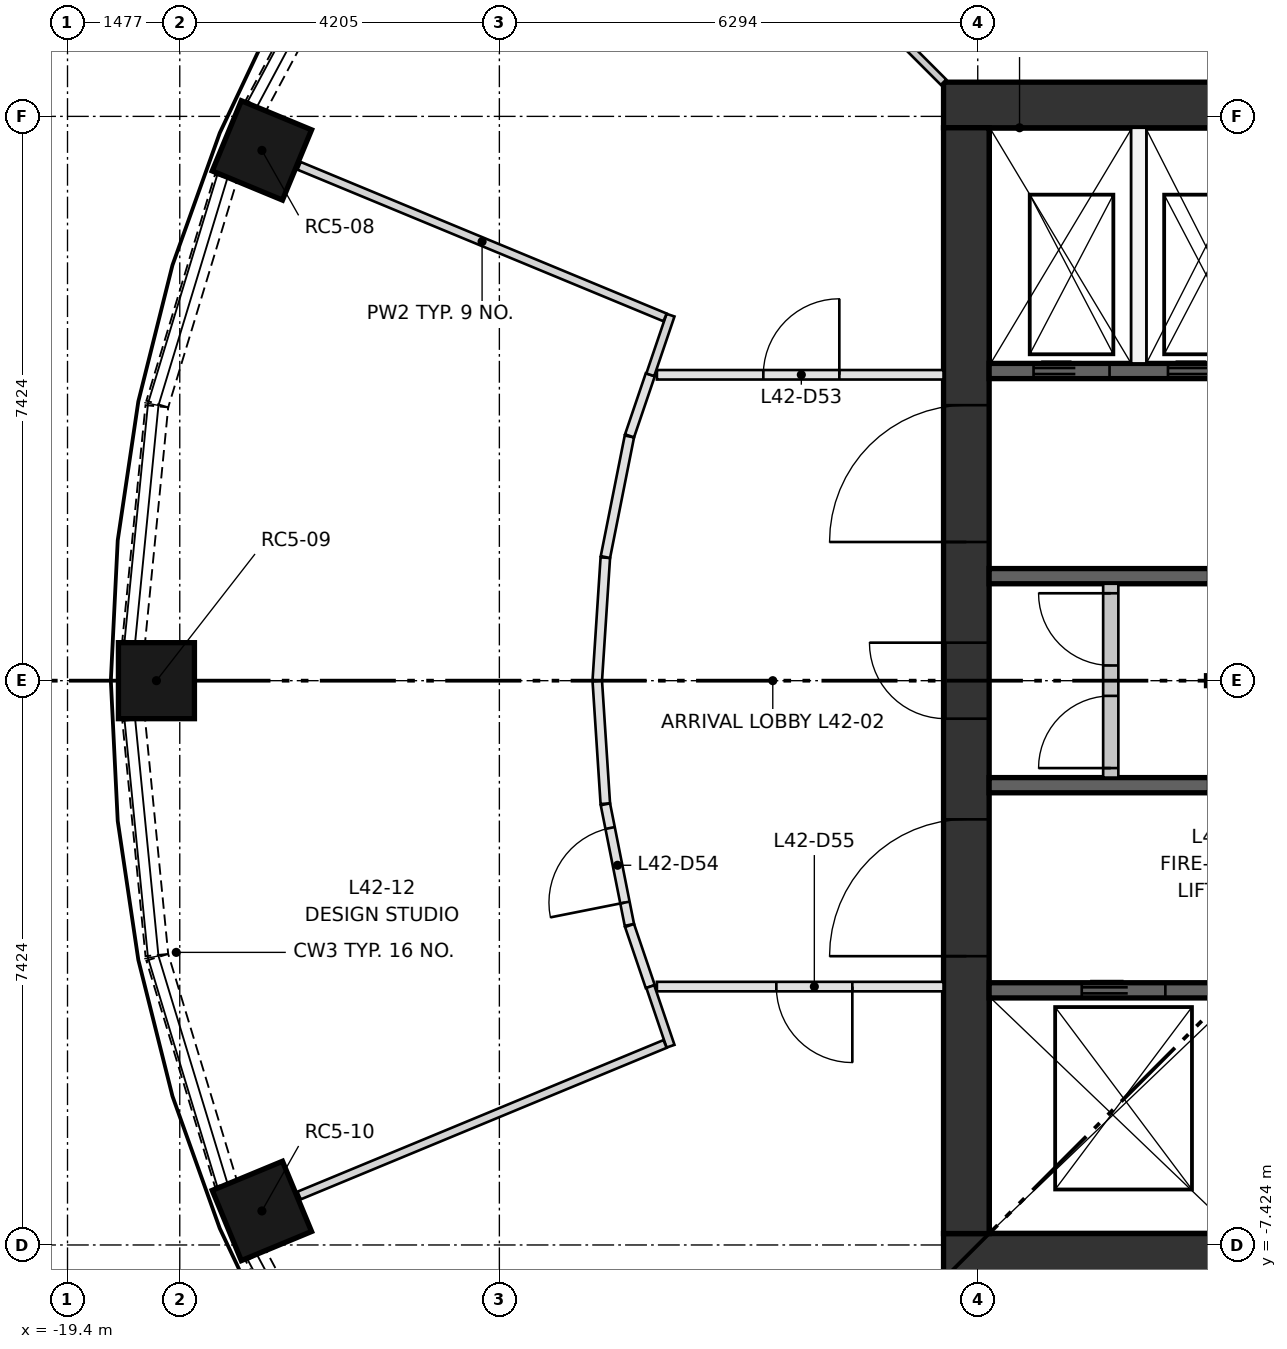
"""IFC4 building model, lengths in metres.
Left out: names, types, materials, properties, quantities, classifications, styles, units other than length and angle.
Written with IfcOpenShell. Run it as: python <this file> out.ifc"""

import sys

from ifc_helpers import new_model, si_unit, direction, frame, frame_2d, origin, origin_2d, place, context, subcontext, project, spatial, rectangle, extrude, element, fill, save


model = new_model("IFC4")
c1 = context("Model", 3, precision=1e-05, world=origin(), true_north=direction((0.0, 1.0)))
c2 = subcontext(c1, "Body", "Model", "MODEL_VIEW")
j1 = project(units=[si_unit("LENGTHUNIT", "METRE"), si_unit("PLANEANGLEUNIT", "RADIAN")], contexts=[c1])
p1 = place(None, origin())
s1 = spatial("IfcSite", under=j1, at=p1, CompositionType="ELEMENT")
p2 = place(p1, origin())
s2 = spatial("IfcBuilding", under=s1, at=p2, CompositionType="ELEMENT")
p3 = place(p2, frame((0.0, 0.0, 157.8)))
s3 = spatial("IfcBuildingStorey", under=s2, at=p3, CompositionType="ELEMENT", Elevation=157.8)
for number, where, z_axis, x_axis in (
    (1, (-16.842, 6.976, 0.0), (0.0, 0.0, 1.0), (-0.924, 0.383, 0.0)),
    (2, (-18.23, 0.0, 0.0), (0.0, 0.0, 1.0), (-1.0, 0.0, 0.0)),
    (3, (-16.842, -6.976, 0.0), (0.0, 0.0, 1.0), (-0.924, -0.383, 0.0)),
):
    element("IfcColumn", number, at=place(p3, frame(where, z_axis=z_axis, x_axis=x_axis)), inside=s3, PredefinedType="COLUMN", context=c2, shape_type="SweptSolid", body=[
        extrude(rectangle(XDim=1.0, YDim=1.0, at=origin_2d()), origin(), (0.0, 0.0, 1.0), 3.35),
    ])
for number, where, z_axis, x_axis in (
    (4, (-7.874, -7.574, 0.0), (0.0, 0.0, 1.0), (1.0, 0.0, 0.0)),
    (5, (-7.874, 7.574, 0.0), (0.0, 0.0, 1.0), (1.0, 0.0, 0.0)),
):
    element("IfcWall", number, at=place(p3, frame(where, z_axis=z_axis, x_axis=x_axis)), inside=s3, PredefinedType="SHEAR", context=c2, shape_type="SweptSolid", body=[
        extrude(rectangle(XDim=15.748, YDim=0.6, at=frame_2d((7.874, 0.0))), origin(), (0.0, 0.0, 1.0), 3.35),
    ])
p4 = place(p3, frame((-7.574, -7.274, 0.0), z_axis=(0.0, 0.0, 1.0), x_axis=(0.0, 1.0, 0.0)))
e6 = element("IfcWall", 6, at=p4, inside=s3, PredefinedType="SHEAR", context=c2, shape_type="SweptSolid", body=[
    extrude(rectangle(XDim=14.548, YDim=0.6, at=frame_2d((7.274, 0.0))), origin(), (0.0, 0.0, 1.0), 3.35),
])
p5 = place(p4, frame((6.774, 0.0, 0.0)))
e7 = element("IfcOpeningElement", 7, at=p5, cuts=e6, PredefinedType="OPENING", context=c2, shape_type="SweptSolid", body=[
    extrude(rectangle(XDim=1.0, YDim=2.1, at=frame_2d((0.5, 1.05))), frame((0.0, 0.31, 0.0), z_axis=(0.0, -1.0, 0.0), x_axis=(1.0, 0.0, 0.0)), (0.0, 0.0, 1.0), 0.62),
])
p6 = place(p4, frame((3.649, 0.0, 0.0)))
e8 = element("IfcOpeningElement", 8, at=p6, cuts=e6, PredefinedType="OPENING", context=c2, shape_type="SweptSolid", body=[
    extrude(rectangle(XDim=1.8, YDim=2.1, at=frame_2d((0.9, 1.05))), frame((0.0, 0.31, 0.0), z_axis=(0.0, -1.0, 0.0), x_axis=(1.0, 0.0, 0.0)), (0.0, 0.0, 1.0), 0.62),
])
p7 = place(p4, frame((9.098, 0.0, 0.0)))
e9 = element("IfcOpeningElement", 9, at=p7, cuts=e6, PredefinedType="OPENING", context=c2, shape_type="SweptSolid", body=[
    extrude(rectangle(XDim=1.8, YDim=2.1, at=frame_2d((0.9, 1.05))), frame((0.0, 0.31, 0.0), z_axis=(0.0, -1.0, 0.0), x_axis=(1.0, 0.0, 0.0)), (0.0, 0.0, 1.0), 0.62),
])
p8 = place(p3, frame((-7.274, -4.074, 0.0), z_axis=(0.0, 0.0, 1.0), x_axis=(1.0, 0.0, 0.0)))
e10 = element("IfcWall", 10, at=p8, inside=s3, PredefinedType="SHEAR", context=c2, shape_type="SweptSolid", body=[
    extrude(rectangle(XDim=14.548, YDim=0.2, at=frame_2d((7.274, 0.0))), origin(), (0.0, 0.0, 1.0), 3.0),
])
p9 = place(p8, frame((1.219, 0.0, 0.0)))
e11 = element("IfcOpeningElement", 11, at=p9, cuts=e10, PredefinedType="OPENING", context=c2, shape_type="SweptSolid", body=[
    extrude(rectangle(XDim=1.1, YDim=2.1, at=frame_2d((0.55, 1.05))), frame((0.0, 0.11, 0.0), z_axis=(0.0, -1.0, 0.0), x_axis=(1.0, 0.0, 0.0)), (0.0, 0.0, 1.0), 0.22),
])
p10 = place(p8, frame((4.355, 0.0, 0.0)))
e12 = element("IfcOpeningElement", 12, at=p10, cuts=e10, PredefinedType="OPENING", context=c2, shape_type="SweptSolid", body=[
    extrude(rectangle(XDim=1.1, YDim=2.1, at=frame_2d((0.55, 1.05))), frame((0.0, 0.11, 0.0), z_axis=(0.0, -1.0, 0.0), x_axis=(1.0, 0.0, 0.0)), (0.0, 0.0, 1.0), 0.22),
])
p11 = place(p8, frame((7.047, 0.0, 0.0)))
e13 = element("IfcOpeningElement", 13, at=p11, cuts=e10, PredefinedType="OPENING", context=c2, shape_type="SweptSolid", body=[
    extrude(rectangle(XDim=0.8, YDim=2.1, at=frame_2d((0.4, 1.05))), frame((0.0, 0.11, 0.0), z_axis=(0.0, -1.0, 0.0), x_axis=(1.0, 0.0, 0.0)), (0.0, 0.0, 1.0), 0.22),
])
p12 = place(p8, frame((9.185, 0.0, 0.0)))
e14 = element("IfcOpeningElement", 14, at=p12, cuts=e10, PredefinedType="OPENING", context=c2, shape_type="SweptSolid", body=[
    extrude(rectangle(XDim=1.0, YDim=2.1, at=frame_2d((0.5, 1.05))), frame((0.0, 0.11, 0.0), z_axis=(0.0, -1.0, 0.0), x_axis=(1.0, 0.0, 0.0)), (0.0, 0.0, 1.0), 0.22),
])
p13 = place(p8, frame((11.228, 0.0, 0.0)))
e15 = element("IfcOpeningElement", 15, at=p13, cuts=e10, PredefinedType="OPENING", context=c2, shape_type="SweptSolid", body=[
    extrude(rectangle(XDim=1.0, YDim=2.1, at=frame_2d((0.5, 1.05))), frame((0.0, 0.11, 0.0), z_axis=(0.0, -1.0, 0.0), x_axis=(1.0, 0.0, 0.0)), (0.0, 0.0, 1.0), 0.22),
])
p14 = place(p8, frame((13.078, 0.0, 0.0)))
e16 = element("IfcOpeningElement", 16, at=p14, cuts=e10, PredefinedType="OPENING", context=c2, shape_type="SweptSolid", body=[
    extrude(rectangle(XDim=1.0, YDim=2.1, at=frame_2d((0.5, 1.05))), frame((0.0, 0.11, 0.0), z_axis=(0.0, -1.0, 0.0), x_axis=(1.0, 0.0, 0.0)), (0.0, 0.0, 1.0), 0.22),
])
p15 = place(p3, frame((-7.274, 4.074, 0.0), z_axis=(0.0, 0.0, 1.0), x_axis=(1.0, 0.0, 0.0)))
e17 = element("IfcWall", 17, at=p15, inside=s3, PredefinedType="SHEAR", context=c2, shape_type="SweptSolid", body=[
    extrude(rectangle(XDim=7.274, YDim=0.2, at=frame_2d((3.637, 0.0))), origin(), (0.0, 0.0, 1.0), 3.0),
])
p16 = place(p15, frame((0.584, 0.0, 0.0)))
e18 = element("IfcOpeningElement", 18, at=p16, cuts=e17, PredefinedType="OPENING", context=c2, shape_type="SweptSolid", body=[
    extrude(rectangle(XDim=1.0, YDim=2.1, at=frame_2d((0.5, 1.05))), frame((0.0, 0.11, 0.0), z_axis=(0.0, -1.0, 0.0), x_axis=(1.0, 0.0, 0.0)), (0.0, 0.0, 1.0), 0.22),
])
p17 = place(p15, frame((2.353, 0.0, 0.0)))
e19 = element("IfcOpeningElement", 19, at=p17, cuts=e17, PredefinedType="OPENING", context=c2, shape_type="SweptSolid", body=[
    extrude(rectangle(XDim=1.0, YDim=2.1, at=frame_2d((0.5, 1.05))), frame((0.0, 0.11, 0.0), z_axis=(0.0, -1.0, 0.0), x_axis=(1.0, 0.0, 0.0)), (0.0, 0.0, 1.0), 0.22),
])
p18 = place(p15, frame((4.121, 0.0, 0.0)))
e20 = element("IfcOpeningElement", 20, at=p18, cuts=e17, PredefinedType="OPENING", context=c2, shape_type="SweptSolid", body=[
    extrude(rectangle(XDim=1.0, YDim=2.1, at=frame_2d((0.5, 1.05))), frame((0.0, 0.11, 0.0), z_axis=(0.0, -1.0, 0.0), x_axis=(1.0, 0.0, 0.0)), (0.0, 0.0, 1.0), 0.22),
])
p19 = place(p15, frame((5.89, 0.0, 0.0)))
e21 = element("IfcOpeningElement", 21, at=p19, cuts=e17, PredefinedType="OPENING", context=c2, shape_type="SweptSolid", body=[
    extrude(rectangle(XDim=1.0, YDim=2.1, at=frame_2d((0.5, 1.05))), frame((0.0, 0.11, 0.0), z_axis=(0.0, -1.0, 0.0), x_axis=(1.0, 0.0, 0.0)), (0.0, 0.0, 1.0), 0.22),
])
for number, where, z_axis, x_axis in (
    (22, (-7.274, -1.375, 0.0), (0.0, 0.0, 1.0), (1.0, 0.0, 0.0)),
    (23, (-7.274, 1.375, 0.0), (0.0, 0.0, 1.0), (1.0, 0.0, 0.0)),
):
    element("IfcWall", number, at=place(p3, frame(where, z_axis=z_axis, x_axis=x_axis)), inside=s3, PredefinedType="SHEAR", context=c2, shape_type="SweptSolid", body=[
        extrude(rectangle(XDim=2.9, YDim=0.2, at=frame_2d((1.45, 0.0))), origin(), (0.0, 0.0, 1.0), 3.0),
    ])
p20 = place(p3, frame((-5.305, 4.174, 0.0), z_axis=(0.0, 0.0, 1.0), x_axis=(0.0, 1.0, 0.0)))
e24 = element("IfcWall", 24, at=p20, inside=s3, PredefinedType="PARTITIONING", context=c2, shape_type="SweptSolid", body=[
    extrude(rectangle(XDim=3.1, YDim=0.2, at=frame_2d((1.55, 0.0))), origin(), (0.0, 0.0, 1.0), 3.0),
])
p21 = place(p3, frame((-5.674, -1.275, 0.0), z_axis=(0.0, 0.0, 1.0), x_axis=(0.0, 1.0, 0.0)))
e25 = element("IfcWall", 25, at=p21, inside=s3, PredefinedType="PARTITIONING", context=c2, shape_type="SweptSolid", body=[
    extrude(rectangle(XDim=2.55, YDim=0.2, at=frame_2d((1.275, 0.0))), origin(), (0.0, 0.0, 1.0), 3.0),
])
p22 = place(p21, frame((0.125, 0.0, 0.0)))
e26 = element("IfcOpeningElement", 26, at=p22, cuts=e25, PredefinedType="OPENING", context=c2, shape_type="SweptSolid", body=[
    extrude(rectangle(XDim=0.95, YDim=2.1, at=frame_2d((0.475, 1.05))), frame((0.0, 0.11, 0.0), z_axis=(0.0, -1.0, 0.0), x_axis=(1.0, 0.0, 0.0)), (0.0, 0.0, 1.0), 0.22),
])
p23 = place(p21, frame((1.475, 0.0, 0.0)))
e27 = element("IfcOpeningElement", 27, at=p23, cuts=e25, PredefinedType="OPENING", context=c2, shape_type="SweptSolid", body=[
    extrude(rectangle(XDim=0.95, YDim=2.1, at=frame_2d((0.475, 1.05))), frame((0.0, 0.11, 0.0), z_axis=(0.0, -1.0, 0.0), x_axis=(1.0, 0.0, 0.0)), (0.0, 0.0, 1.0), 0.22),
])
p24 = place(p3, frame((-15.455, 10.309, 0.0), z_axis=(0.0, 0.0, 1.0), x_axis=(-0.471467771589, -0.881883291798, 0.0)))
e28 = element("IfcWall", 28, at=p24, inside=s3, PredefinedType="SOLIDWALL", context=c2, shape_type="SweptSolid", body=[
    extrude(rectangle(XDim=3.111, YDim=0.3, at=frame_2d((1.556, 0.0))), origin(), (0.0, 0.0, 1.0), 0.9),
])
p25 = place(p3, frame((-17.315, 6.617, 0.0), z_axis=(0.0, 0.0, 1.0), x_axis=(-0.29026219948, -0.956947154002, 0.0)))
e29 = element("IfcWall", 29, at=p25, inside=s3, PredefinedType="SOLIDWALL", context=c2, shape_type="SweptSolid", body=[
    extrude(rectangle(XDim=3.111, YDim=0.3, at=frame_2d((1.556, 0.0))), origin(), (0.0, 0.0, 1.0), 0.9),
])
for number, where, z_axis, x_axis in (
    (30, (-18.225, 3.61, 0.0), (0.0, 0.0, 1.0), (-0.098, -0.995, 0.0)),
    (31, (-18.53, -0.514, 0.0), (0.0, 0.0, 1.0), (0.098, -0.995, 0.0)),
):
    element("IfcWall", number, at=place(p3, frame(where, z_axis=z_axis, x_axis=x_axis)), inside=s3, PredefinedType="SOLIDWALL", context=c2, shape_type="SweptSolid", body=[
        extrude(rectangle(XDim=3.111, YDim=0.3, at=frame_2d((1.556, 0.0))), origin(), (0.0, 0.0, 1.0), 0.9),
    ])
p26 = place(p3, frame((-18.219, -3.639, 0.0), z_axis=(0.0, 0.0, 1.0), x_axis=(0.29026219948, -0.956947154002, 0.0)))
e32 = element("IfcWall", 32, at=p26, inside=s3, PredefinedType="SOLIDWALL", context=c2, shape_type="SweptSolid", body=[
    extrude(rectangle(XDim=3.111, YDim=0.3, at=frame_2d((1.556, 0.0))), origin(), (0.0, 0.0, 1.0), 0.9),
])
p27 = place(p3, frame((-16.922, -7.565, 0.0), z_axis=(0.0, 0.0, 1.0), x_axis=(0.471467771589, -0.881883291798, 0.0)))
e33 = element("IfcWall", 33, at=p27, inside=s3, PredefinedType="SOLIDWALL", context=c2, shape_type="SweptSolid", body=[
    extrude(rectangle(XDim=3.111, YDim=0.3, at=frame_2d((1.556, 0.0))), origin(), (0.0, 0.0, 1.0), 0.9),
])
p28 = place(p3, frame((-11.645, 4.024, 0.0), z_axis=(0.0, 0.0, 1.0), x_axis=(1.0, 0.0, 0.0)))
e34 = element("IfcWall", 34, at=p28, inside=s3, PredefinedType="PARTITIONING", context=c2, shape_type="SweptSolid", body=[
    extrude(rectangle(XDim=3.771, YDim=0.125, at=frame_2d((1.886, 0.0))), origin(), (0.0, 0.0, 1.0), 3.0),
])
p29 = place(p28, frame((1.4, 0.0, 0.0)))
e35 = element("IfcOpeningElement", 35, at=p29, cuts=e34, PredefinedType="OPENING", context=c2, shape_type="SweptSolid", body=[
    extrude(rectangle(XDim=1.0, YDim=2.1, at=frame_2d((0.5, 1.05))), frame((0.0, 0.073, 0.0), z_axis=(0.0, -1.0, 0.0), x_axis=(1.0, 0.0, 0.0)), (0.0, 0.0, 1.0), 0.145),
])
for number, where, z_axis, x_axis in (
    (36, (-12.43, 0.004, 0.0), (0.0, 0.0, 1.0), (0.065, 0.998, 0.0)),
    (37, (-12.324, -1.618, 0.0), (0.0, 0.0, 1.0), (-0.065, 0.998, 0.0)),
    (38, (-12.323, 1.626, 0.0), (0.0, 0.0, 1.0), (0.195, 0.981, 0.0)),
):
    element("IfcWall", number, at=place(p3, frame(where, z_axis=z_axis, x_axis=x_axis)), inside=s3, PredefinedType="PARTITIONING", context=c2, shape_type="SweptSolid", body=[
        extrude(rectangle(XDim=1.618, YDim=0.125, at=frame_2d((0.809, 0.0))), origin(), (0.0, 0.0, 1.0), 3.0),
    ])
p30 = place(p3, frame((-12.007, -3.213, 0.0), z_axis=(0.0, 0.0, 1.0), x_axis=(-0.195129303098, 0.980777525779, 0.0)))
e39 = element("IfcWall", 39, at=p30, inside=s3, PredefinedType="PARTITIONING", context=c2, shape_type="SweptSolid", body=[
    extrude(rectangle(XDim=1.618, YDim=0.125, at=frame_2d((0.809, 0.0))), origin(), (0.0, 0.0, 1.0), 3.0),
])
p31 = place(p30, frame((0.3, 0.0, 0.0)))
e40 = element("IfcOpeningElement", 40, at=p31, cuts=e39, PredefinedType="OPENING", context=c2, shape_type="SweptSolid", body=[
    extrude(rectangle(XDim=1.0, YDim=2.1, at=frame_2d((0.5, 1.05))), frame((0.0, 0.073, 0.0), z_axis=(0.0, -1.0, 0.0), x_axis=(1.0, 0.0, 0.0)), (0.0, 0.0, 1.0), 0.145),
])
for number, where, z_axis, x_axis in (
    (41, (-12.005, 3.221, 0.0), (0.0, 0.0, 1.0), (0.321, 0.947, 0.0)),
    (42, (-11.732, -4.024, 0.0), (0.0, 0.0, 1.0), (-0.321, 0.947, 0.0)),
):
    element("IfcWall", number, at=place(p3, frame(where, z_axis=z_axis, x_axis=x_axis)), inside=s3, PredefinedType="PARTITIONING", context=c2, shape_type="SweptSolid", body=[
        extrude(rectangle(XDim=0.848, YDim=0.125, at=frame_2d((0.424, 0.0))), origin(), (0.0, 0.0, 1.0), 3.0),
    ])
p32 = place(p3, frame((-7.874, -4.024, 0.0), z_axis=(0.0, 0.0, 1.0), x_axis=(-1.0, 0.0, 0.0)))
e43 = element("IfcWall", 43, at=p32, inside=s3, PredefinedType="PARTITIONING", context=c2, shape_type="SweptSolid", body=[
    extrude(rectangle(XDim=3.771, YDim=0.125, at=frame_2d((1.886, 0.0))), origin(), (0.0, 0.0, 1.0), 3.0),
])
p33 = place(p32, frame((1.2, 0.0, 0.0)))
e44 = element("IfcOpeningElement", 44, at=p33, cuts=e43, PredefinedType="OPENING", context=c2, shape_type="SweptSolid", body=[
    extrude(rectangle(XDim=1.0, YDim=2.1, at=frame_2d((0.5, 1.05))), frame((0.0, 0.073, 0.0), z_axis=(0.0, -1.0, 0.0), x_axis=(1.0, 0.0, 0.0)), (0.0, 0.0, 1.0), 0.145),
])
p34 = place(p3, frame((-3.261, 7.874, 0.0), z_axis=(0.0, 0.0, 1.0), x_axis=(-0.382691869474, 0.923876037701, 0.0)))
e45 = element("IfcWall", 45, at=p34, inside=s3, PredefinedType="PARTITIONING", context=c2, shape_type="SweptSolid", body=[
    extrude(rectangle(XDim=4.607, YDim=0.105, at=frame_2d((2.304, 0.0))), origin(), (0.0, 0.0, 1.0), 3.0),
])
p35 = place(p3, frame((-12.516, 12.516, 0.0), z_axis=(0.0, 0.0, 1.0), x_axis=(0.707106781187, -0.707106781187, 0.0)))
e46 = element("IfcWall", 46, at=p35, inside=s3, PredefinedType="PARTITIONING", context=c2, shape_type="SweptSolid", body=[
    extrude(rectangle(XDim=6.564, YDim=0.1, at=frame_2d((3.282, 0.0))), origin(), (0.0, 0.0, 1.0), 3.0),
])
p36 = place(p35, frame((3.0, 0.0, 0.0)))
e47 = element("IfcOpeningElement", 47, at=p36, cuts=e46, PredefinedType="OPENING", context=c2, shape_type="SweptSolid", body=[
    extrude(rectangle(XDim=1.0, YDim=2.1, at=frame_2d((0.5, 1.05))), frame((0.0, 0.06, 0.0), z_axis=(0.0, -1.0, 0.0), x_axis=(1.0, 0.0, 0.0)), (0.0, 0.0, 1.0), 0.12),
])
p37 = place(p3, frame((-11.732, 4.024, 0.0), z_axis=(0.0, 0.0, 1.0), x_axis=(0.321527585288, 0.946900212218, 0.0)))
e48 = element("IfcWall", 48, at=p37, inside=s3, PredefinedType="PARTITIONING", context=c2, shape_type="SweptSolid", body=[
    extrude(rectangle(XDim=0.828, YDim=0.11, at=frame_2d((0.414, 0.0))), origin(), (0.0, 0.0, 1.0), 3.0),
])
p38 = place(p3, frame((-11.538, 4.779, 0.0), z_axis=(0.0, 0.0, 1.0), x_axis=(-0.923891220199, 0.382655214572, 0.0)))
e49 = element("IfcWall", 49, at=p38, inside=s3, PredefinedType="PARTITIONING", context=c2, shape_type="SweptSolid", body=[
    extrude(rectangle(XDim=5.211, YDim=0.11, at=frame_2d((2.606, 0.0))), origin(), (0.0, 0.0, 1.0), 3.0),
])
p39 = place(p3, frame((-11.732, -4.024, 0.0), z_axis=(0.0, 0.0, 1.0), x_axis=(0.321527585288, -0.946900212218, 0.0)))
e50 = element("IfcWall", 50, at=p39, inside=s3, PredefinedType="PARTITIONING", context=c2, shape_type="SweptSolid", body=[
    extrude(rectangle(XDim=0.828, YDim=0.11, at=frame_2d((0.414, 0.0))), origin(), (0.0, 0.0, 1.0), 3.0),
])
p40 = place(p3, frame((-11.538, -4.779, 0.0), z_axis=(0.0, 0.0, 1.0), x_axis=(-0.923891220199, -0.382655214572, 0.0)))
e51 = element("IfcWall", 51, at=p40, inside=s3, PredefinedType="PARTITIONING", context=c2, shape_type="SweptSolid", body=[
    extrude(rectangle(XDim=5.211, YDim=0.11, at=frame_2d((2.606, 0.0))), origin(), (0.0, 0.0, 1.0), 3.0),
])
p41 = place(p9, origin())
e52 = element("IfcDoor", 52, at=p41, inside=s3, OperationType="DOUBLE_DOOR_SLIDING", PredefinedType="DOOR", context=c2, shape_type="SweptSolid", body=[
    extrude(rectangle(XDim=1.1, YDim=2.1, at=frame_2d((0.55, 1.05))), frame((0.0, 0.025, 0.0), z_axis=(0.0, -1.0, 0.0), x_axis=(1.0, 0.0, 0.0)), (0.0, 0.0, 1.0), 0.05),
])
fill(e11, e52)
p42 = place(p16, frame((1.0, 0.0, 0.0), z_axis=(0.0, 0.0, 1.0), x_axis=(-1.0, 0.0, 0.0)))
e53 = element("IfcDoor", 53, at=p42, inside=s3, OperationType="DOUBLE_DOOR_SLIDING", PredefinedType="DOOR", context=c2, shape_type="SweptSolid", body=[
    extrude(rectangle(XDim=1.0, YDim=2.1, at=frame_2d((0.5, 1.05))), frame((0.0, 0.025, 0.0), z_axis=(0.0, -1.0, 0.0), x_axis=(1.0, 0.0, 0.0)), (0.0, 0.0, 1.0), 0.05),
])
fill(e18, e53)
p43 = place(p17, frame((1.0, 0.0, 0.0), z_axis=(0.0, 0.0, 1.0), x_axis=(-1.0, 0.0, 0.0)))
e54 = element("IfcDoor", 54, at=p43, inside=s3, OperationType="DOUBLE_DOOR_SLIDING", PredefinedType="DOOR", context=c2, shape_type="SweptSolid", body=[
    extrude(rectangle(XDim=1.0, YDim=2.1, at=frame_2d((0.5, 1.05))), frame((0.0, 0.025, 0.0), z_axis=(0.0, -1.0, 0.0), x_axis=(1.0, 0.0, 0.0)), (0.0, 0.0, 1.0), 0.05),
])
fill(e19, e54)
p44 = place(p22, origin())
e55 = element("IfcDoor", 55, at=p44, inside=s3, OperationType="SINGLE_SWING_LEFT", PredefinedType="DOOR", context=c2, shape_type="SweptSolid", body=[
    extrude(rectangle(XDim=0.95, YDim=2.1, at=frame_2d((0.475, 1.05))), frame((0.0, 0.025, 0.0), z_axis=(0.0, -1.0, 0.0), x_axis=(1.0, 0.0, 0.0)), (0.0, 0.0, 1.0), 0.05),
])
fill(e26, e55)
p45 = place(p23, origin())
e56 = element("IfcDoor", 56, at=p45, inside=s3, OperationType="SINGLE_SWING_RIGHT", PredefinedType="DOOR", context=c2, shape_type="SweptSolid", body=[
    extrude(rectangle(XDim=0.95, YDim=2.1, at=frame_2d((0.475, 1.05))), frame((0.0, 0.025, 0.0), z_axis=(0.0, -1.0, 0.0), x_axis=(1.0, 0.0, 0.0)), (0.0, 0.0, 1.0), 0.05),
])
fill(e27, e56)
p46 = place(p5, origin())
e57 = element("IfcDoor", 57, at=p46, inside=s3, OperationType="SINGLE_SWING_RIGHT", PredefinedType="DOOR", context=c2, shape_type="SweptSolid", body=[
    extrude(rectangle(XDim=1.0, YDim=2.1, at=frame_2d((0.5, 1.05))), frame((0.0, 0.3, 0.0), z_axis=(0.0, -1.0, 0.0), x_axis=(1.0, 0.0, 0.0)), (0.0, 0.0, 1.0), 0.05),
])
fill(e7, e57)
p47 = place(p6, origin())
e58 = element("IfcDoor", 58, at=p47, inside=s3, OperationType="DOUBLE_DOOR_SINGLE_SWING", PredefinedType="DOOR", context=c2, shape_type="SweptSolid", body=[
    extrude(rectangle(XDim=1.8, YDim=2.1, at=frame_2d((0.9, 1.05))), frame((0.0, 0.025, 0.0), z_axis=(0.0, -1.0, 0.0), x_axis=(1.0, 0.0, 0.0)), (0.0, 0.0, 1.0), 0.05),
])
fill(e8, e58)
p48 = place(p7, origin())
e59 = element("IfcDoor", 59, at=p48, inside=s3, OperationType="DOUBLE_DOOR_SINGLE_SWING", PredefinedType="DOOR", context=c2, shape_type="SweptSolid", body=[
    extrude(rectangle(XDim=1.8, YDim=2.1, at=frame_2d((0.9, 1.05))), frame((0.0, 0.025, 0.0), z_axis=(0.0, -1.0, 0.0), x_axis=(1.0, 0.0, 0.0)), (0.0, 0.0, 1.0), 0.05),
])
fill(e9, e59)
p49 = place(p29, origin())
e60 = element("IfcDoor", 60, at=p49, inside=s3, OperationType="SINGLE_SWING_RIGHT", PredefinedType="DOOR", context=c2, shape_type="SweptSolid", body=[
    extrude(rectangle(XDim=1.0, YDim=2.1, at=frame_2d((0.5, 1.05))), frame((0.0, 0.025, 0.0), z_axis=(0.0, -1.0, 0.0), x_axis=(1.0, 0.0, 0.0)), (0.0, 0.0, 1.0), 0.05),
])
fill(e35, e60)
p50 = place(p31, origin())
e61 = element("IfcDoor", 61, at=p50, inside=s3, OperationType="SINGLE_SWING_LEFT", PredefinedType="DOOR", context=c2, shape_type="SweptSolid", body=[
    extrude(rectangle(XDim=1.0, YDim=2.1, at=frame_2d((0.5, 1.05))), frame((0.0, 0.025, 0.0), z_axis=(0.0, -1.0, 0.0), x_axis=(1.0, 0.0, 0.0)), (0.0, 0.0, 1.0), 0.05),
])
fill(e40, e61)
p51 = place(p33, origin())
e62 = element("IfcDoor", 62, at=p51, inside=s3, OperationType="SINGLE_SWING_LEFT", PredefinedType="DOOR", context=c2, shape_type="SweptSolid", body=[
    extrude(rectangle(XDim=1.0, YDim=2.1, at=frame_2d((0.5, 1.05))), frame((0.0, 0.025, 0.0), z_axis=(0.0, -1.0, 0.0), x_axis=(1.0, 0.0, 0.0)), (0.0, 0.0, 1.0), 0.05),
])
fill(e44, e62)
save(model, sys.argv[1])
